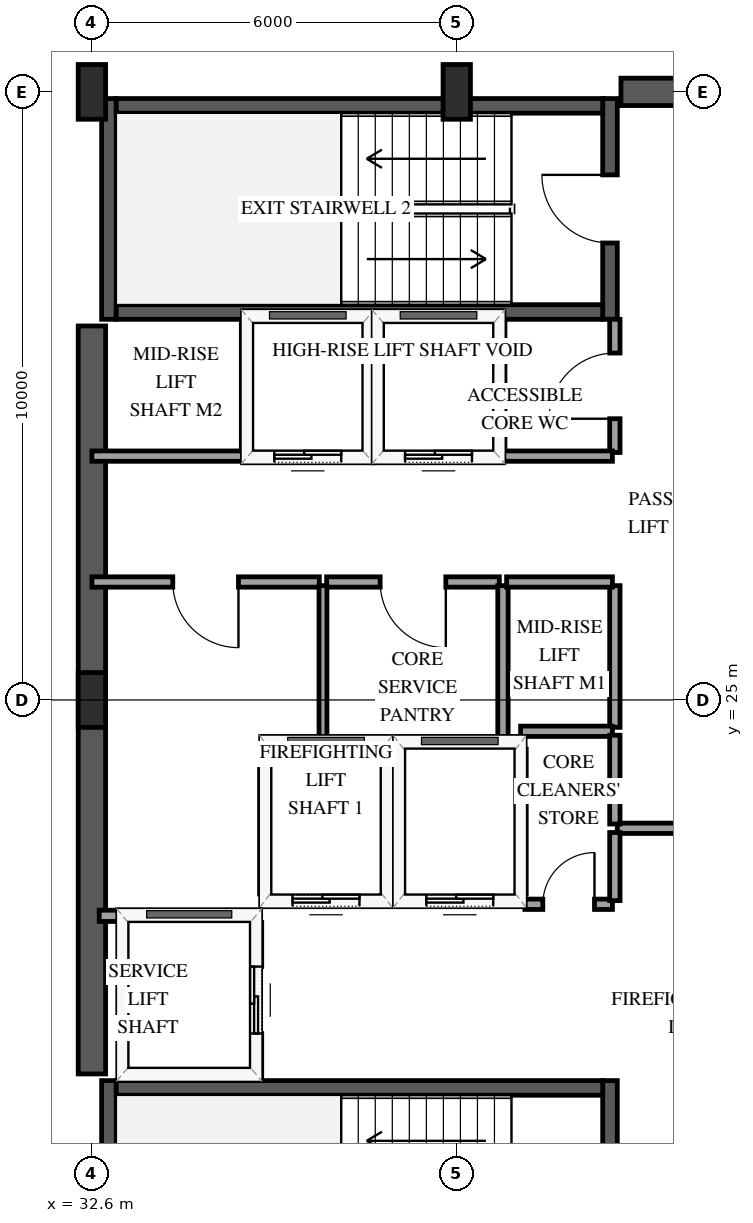
"""IFC4 building model, lengths in metres.
Left out: names, types, materials, properties, quantities, classifications, styles, units other than length and angle.
Written with IfcOpenShell. Run it as: python <this file> out.ifc"""

import sys

from ifc_helpers import new_model, si_unit, direction, frame, frame_2d, origin, origin_2d, place, context, subcontext, project, spatial, rectangle, extrude, element, fill, save


model = new_model("IFC4")
c1 = context("Model", 3, precision=1e-05, world=origin(), true_north=direction((0.0, 1.0)))
c2 = subcontext(c1, "Body", "Model", "MODEL_VIEW")
j1 = project(units=[si_unit("LENGTHUNIT", "METRE"), si_unit("PLANEANGLEUNIT", "RADIAN")], contexts=[c1])
p1 = place(None, origin())
s1 = spatial("IfcSite", under=j1, at=p1, CompositionType="ELEMENT")
p2 = place(p1, origin())
s2 = spatial("IfcBuilding", under=s1, at=p2, CompositionType="ELEMENT")
p3 = place(p2, frame((0.0, 0.0, 242.5)))
s3 = spatial("IfcBuildingStorey", under=s2, at=p3, CompositionType="ELEMENT", Elevation=242.5)
p4 = place(p3, frame((32.88, 15.11, 0.0), z_axis=(0.0, 0.0, 1.0), x_axis=(0.0, 1.0, 0.0)))
e1 = element("IfcWall", 1, at=p4, inside=s3, PredefinedType="SHEAR", context=c2, shape_type="SweptSolid", body=[
    extrude(rectangle(XDim=3.63, YDim=0.24, at=frame_2d((1.815, 0.0))), origin(), (0.0, 0.0, 1.0), 3.75),
])
p5 = place(p3, frame((41.12, 15.11, 0.0), z_axis=(0.0, 0.0, 1.0), x_axis=(0.0, 1.0, 0.0)))
e2 = element("IfcWall", 2, at=p5, inside=s3, PredefinedType="SHEAR", context=c2, shape_type="SweptSolid", body=[
    extrude(rectangle(XDim=3.63, YDim=0.24, at=frame_2d((1.815, 0.0))), origin(), (0.0, 0.0, 1.0), 3.75),
])
p6 = place(p5, frame((1.255, 0.0, 0.0)))
e3 = element("IfcOpeningElement", 3, at=p6, cuts=e2, PredefinedType="OPENING", context=c2, shape_type="SweptSolid", body=[
    extrude(rectangle(XDim=1.12, YDim=2.15, at=frame_2d((0.56, 1.075))), frame((0.0, 0.13, 0.0), z_axis=(0.0, -1.0, 0.0), x_axis=(1.0, 0.0, 0.0)), (0.0, 0.0, 1.0), 0.26),
])
p7 = place(p3, frame((33.0, 18.62, 0.0), z_axis=(0.0, 0.0, 1.0), x_axis=(1.0, 0.0, 0.0)))
e4 = element("IfcWall", 4, at=p7, inside=s3, PredefinedType="SHEAR", context=c2, shape_type="SweptSolid", body=[
    extrude(rectangle(XDim=8.0, YDim=0.24, at=frame_2d((4.0, 0.0))), origin(), (0.0, 0.0, 1.0), 3.75),
])
p8 = place(p3, frame((32.88, 31.26, 0.0), z_axis=(0.0, 0.0, 1.0), x_axis=(0.0, 1.0, 0.0)))
e5 = element("IfcWall", 5, at=p8, inside=s3, PredefinedType="SHEAR", context=c2, shape_type="SweptSolid", body=[
    extrude(rectangle(XDim=3.63, YDim=0.24, at=frame_2d((1.815, 0.0))), origin(), (0.0, 0.0, 1.0), 3.75),
])
p9 = place(p3, frame((41.12, 31.26, 0.0), z_axis=(0.0, 0.0, 1.0), x_axis=(0.0, 1.0, 0.0)))
e6 = element("IfcWall", 6, at=p9, inside=s3, PredefinedType="SHEAR", context=c2, shape_type="SweptSolid", body=[
    extrude(rectangle(XDim=3.63, YDim=0.24, at=frame_2d((1.815, 0.0))), origin(), (0.0, 0.0, 1.0), 3.75),
])
p10 = place(p9, frame((1.255, 0.0, 0.0)))
e7 = element("IfcOpeningElement", 7, at=p10, cuts=e6, PredefinedType="OPENING", context=c2, shape_type="SweptSolid", body=[
    extrude(rectangle(XDim=1.12, YDim=2.15, at=frame_2d((0.56, 1.075))), frame((0.0, 0.13, 0.0), z_axis=(0.0, -1.0, 0.0), x_axis=(1.0, 0.0, 0.0)), (0.0, 0.0, 1.0), 0.26),
])
for number, where, z_axis, x_axis in (
    (8, (33.0, 31.38, 0.0), (0.0, 0.0, 1.0), (1.0, 0.0, 0.0)),
    (9, (33.0, 34.77, 0.0), (0.0, 0.0, 1.0), (1.0, 0.0, 0.0)),
):
    element("IfcWall", number, at=place(p3, frame(where, z_axis=z_axis, x_axis=x_axis)), inside=s3, PredefinedType="SHEAR", context=c2, shape_type="SweptSolid", body=[
        extrude(rectangle(XDim=8.0, YDim=0.24, at=frame_2d((4.0, 0.0))), origin(), (0.0, 0.0, 1.0), 3.75),
    ])
p11 = place(p3, frame((32.6, 18.85, 0.0), z_axis=(0.0, 0.0, 1.0), x_axis=(0.0, 1.0, 0.0)))
e10 = element("IfcWall", 10, at=p11, inside=s3, PredefinedType="SHEAR", context=c2, shape_type="SweptSolid", body=[
    extrude(rectangle(XDim=12.3, YDim=0.45, at=frame_2d((6.15, 0.0))), origin(), (0.0, 0.0, 1.0), 3.75),
])
p12 = place(p3, frame((41.3, 35.0, 0.0), z_axis=(0.0, 0.0, 1.0), x_axis=(1.0, 0.0, 0.0)))
e11 = element("IfcWall", 11, at=p12, inside=s3, PredefinedType="SHEAR", context=c2, shape_type="SweptSolid", body=[
    extrude(rectangle(XDim=2.85, YDim=0.45, at=frame_2d((1.425, 0.0))), origin(), (0.0, 0.0, 1.0), 3.75),
])
for number, where, z_axis, x_axis in (
    (12, (32.6, 25.0, -0.3), (0.0, 0.0, 1.0), (1.0, 0.0, 0.0)),
    (13, (32.6, 35.0, -0.3), (0.0, 0.0, 1.0), (1.0, 0.0, 0.0)),
    (14, (38.6, 35.0, -0.3), (0.0, 0.0, 1.0), (1.0, 0.0, 0.0)),
):
    element("IfcColumn", number, at=place(p3, frame(where, z_axis=z_axis, x_axis=x_axis)), inside=s3, PredefinedType="PILASTER", context=c2, shape_type="SweptSolid", body=[
        extrude(rectangle(XDim=0.45, YDim=0.9, at=origin_2d()), origin(), (0.0, 0.0, 1.0), 4.05),
    ])
p13 = place(p3, frame((35.45, 21.7, 0.0), z_axis=(0.0, 0.0, 1.0), x_axis=(1.0, 0.0, 0.0)))
e15 = element("IfcWall", 15, at=p13, inside=s3, PredefinedType="SOLIDWALL", context=c2, shape_type="SweptSolid", body=[
    extrude(rectangle(XDim=2.0, YDim=0.185, at=frame_2d((1.0, 0.0))), origin(), (0.0, 0.0, 1.0), 3.45),
])
p14 = place(p13, frame((0.45, 0.0, 0.0)))
e16 = element("IfcOpeningElement", 16, at=p14, cuts=e15, PredefinedType="OPENING", context=c2, shape_type="SweptSolid", body=[
    extrude(rectangle(XDim=1.1, YDim=2.15, at=frame_2d((0.55, 1.075))), frame((0.0, 0.103, 0.0), z_axis=(0.0, -1.0, 0.0), x_axis=(1.0, 0.0, 0.0)), (0.0, 0.0, 1.0), 0.205),
])
p15 = place(p3, frame((35.45, 24.3, 0.0), z_axis=(0.0, 0.0, 1.0), x_axis=(1.0, 0.0, 0.0)))
e17 = element("IfcWall", 17, at=p15, inside=s3, PredefinedType="SOLIDWALL", context=c2, shape_type="SweptSolid", body=[
    extrude(rectangle(XDim=2.0, YDim=0.185, at=frame_2d((1.0, 0.0))), origin(), (0.0, 0.0, 1.0), 3.45),
])
for number, where, z_axis, x_axis in (
    (18, (35.45, 21.81, 0.0), (0.0, 0.0, 1.0), (0.0, 1.0, 0.0)),
    (19, (37.45, 21.81, 0.0), (0.0, 0.0, 1.0), (0.0, 1.0, 0.0)),
):
    element("IfcWall", number, at=place(p3, frame(where, z_axis=z_axis, x_axis=x_axis)), inside=s3, PredefinedType="SOLIDWALL", context=c2, shape_type="SweptSolid", body=[
        extrude(rectangle(XDim=2.38, YDim=0.185, at=frame_2d((1.19, 0.0))), origin(), (0.0, 0.0, 1.0), 3.45),
    ])
p16 = place(p3, frame((37.65, 21.7, 0.0), z_axis=(0.0, 0.0, 1.0), x_axis=(1.0, 0.0, 0.0)))
e20 = element("IfcWall", 20, at=p16, inside=s3, PredefinedType="SOLIDWALL", context=c2, shape_type="SweptSolid", body=[
    extrude(rectangle(XDim=2.0, YDim=0.185, at=frame_2d((1.0, 0.0))), origin(), (0.0, 0.0, 1.0), 3.45),
])
p17 = place(p16, frame((0.45, 0.0, 0.0)))
e21 = element("IfcOpeningElement", 21, at=p17, cuts=e20, PredefinedType="OPENING", context=c2, shape_type="SweptSolid", body=[
    extrude(rectangle(XDim=1.1, YDim=2.15, at=frame_2d((0.55, 1.075))), frame((0.0, 0.103, 0.0), z_axis=(0.0, -1.0, 0.0), x_axis=(1.0, 0.0, 0.0)), (0.0, 0.0, 1.0), 0.205),
])
p18 = place(p3, frame((37.65, 24.3, 0.0), z_axis=(0.0, 0.0, 1.0), x_axis=(1.0, 0.0, 0.0)))
e22 = element("IfcWall", 22, at=p18, inside=s3, PredefinedType="SOLIDWALL", context=c2, shape_type="SweptSolid", body=[
    extrude(rectangle(XDim=2.0, YDim=0.185, at=frame_2d((1.0, 0.0))), origin(), (0.0, 0.0, 1.0), 3.45),
])
p19 = place(p3, frame((39.65, 21.81, 0.0), z_axis=(0.0, 0.0, 1.0), x_axis=(0.0, 1.0, 0.0)))
e23 = element("IfcWall", 23, at=p19, inside=s3, PredefinedType="SOLIDWALL", context=c2, shape_type="SweptSolid", body=[
    extrude(rectangle(XDim=2.38, YDim=0.185, at=frame_2d((1.19, 0.0))), origin(), (0.0, 0.0, 1.0), 3.45),
])
p20 = place(p3, frame((32.72, 21.45, 0.0), z_axis=(0.0, 0.0, 1.0), x_axis=(1.0, 0.0, 0.0)))
e24 = element("IfcWall", 24, at=p20, inside=s3, PredefinedType="SOLIDWALL", context=c2, shape_type="SweptSolid", body=[
    extrude(rectangle(XDim=2.58, YDim=0.185, at=frame_2d((1.29, 0.0))), origin(), (0.0, 0.0, 1.0), 3.45),
])
p21 = place(p3, frame((35.3, 18.79, 0.0), z_axis=(0.0, 0.0, 1.0), x_axis=(0.0, 1.0, 0.0)))
e25 = element("IfcWall", 25, at=p21, inside=s3, PredefinedType="SOLIDWALL", context=c2, shape_type="SweptSolid", body=[
    extrude(rectangle(XDim=2.55, YDim=0.185, at=frame_2d((1.275, 0.0))), origin(), (0.0, 0.0, 1.0), 3.45),
])
p22 = place(p21, frame((0.725, 0.0, 0.0)))
e26 = element("IfcOpeningElement", 26, at=p22, cuts=e25, PredefinedType="OPENING", context=c2, shape_type="SweptSolid", body=[
    extrude(rectangle(XDim=1.1, YDim=2.15, at=frame_2d((0.55, 1.075))), frame((0.0, 0.103, 0.0), z_axis=(0.0, -1.0, 0.0), x_axis=(1.0, 0.0, 0.0)), (0.0, 0.0, 1.0), 0.205),
])
p23 = place(p3, frame((35.15, 29.0, 0.0), z_axis=(0.0, 0.0, 1.0), x_axis=(1.0, 0.0, 0.0)))
e27 = element("IfcWall", 27, at=p23, inside=s3, PredefinedType="SOLIDWALL", context=c2, shape_type="SweptSolid", body=[
    extrude(rectangle(XDim=2.0, YDim=0.185, at=frame_2d((1.0, 0.0))), origin(), (0.0, 0.0, 1.0), 3.45),
])
p24 = place(p23, frame((0.45, 0.0, 0.0)))
e28 = element("IfcOpeningElement", 28, at=p24, cuts=e27, PredefinedType="OPENING", context=c2, shape_type="SweptSolid", body=[
    extrude(rectangle(XDim=1.1, YDim=2.15, at=frame_2d((0.55, 1.075))), frame((0.0, 0.103, 0.0), z_axis=(0.0, -1.0, 0.0), x_axis=(1.0, 0.0, 0.0)), (0.0, 0.0, 1.0), 0.205),
])
for number, where, z_axis, x_axis in (
    (29, (35.15, 29.11, 0.0), (0.0, 0.0, 1.0), (0.0, 1.0, 0.0)),
    (30, (37.15, 29.11, 0.0), (0.0, 0.0, 1.0), (0.0, 1.0, 0.0)),
):
    element("IfcWall", number, at=place(p3, frame(where, z_axis=z_axis, x_axis=x_axis)), inside=s3, PredefinedType="SOLIDWALL", context=c2, shape_type="SweptSolid", body=[
        extrude(rectangle(XDim=2.1, YDim=0.185, at=frame_2d((1.05, 0.0))), origin(), (0.0, 0.0, 1.0), 3.45),
    ])
p25 = place(p3, frame((37.3, 29.0, 0.0), z_axis=(0.0, 0.0, 1.0), x_axis=(1.0, 0.0, 0.0)))
e31 = element("IfcWall", 31, at=p25, inside=s3, PredefinedType="SOLIDWALL", context=c2, shape_type="SweptSolid", body=[
    extrude(rectangle(XDim=2.0, YDim=0.185, at=frame_2d((1.0, 0.0))), origin(), (0.0, 0.0, 1.0), 3.45),
])
p26 = place(p25, frame((0.45, 0.0, 0.0)))
e32 = element("IfcOpeningElement", 32, at=p26, cuts=e31, PredefinedType="OPENING", context=c2, shape_type="SweptSolid", body=[
    extrude(rectangle(XDim=1.1, YDim=2.15, at=frame_2d((0.55, 1.075))), frame((0.0, 0.103, 0.0), z_axis=(0.0, -1.0, 0.0), x_axis=(1.0, 0.0, 0.0)), (0.0, 0.0, 1.0), 0.205),
])
p27 = place(p3, frame((39.3, 29.11, 0.0), z_axis=(0.0, 0.0, 1.0), x_axis=(0.0, 1.0, 0.0)))
e33 = element("IfcWall", 33, at=p27, inside=s3, PredefinedType="SOLIDWALL", context=c2, shape_type="SweptSolid", body=[
    extrude(rectangle(XDim=2.1, YDim=0.185, at=frame_2d((1.05, 0.0))), origin(), (0.0, 0.0, 1.0), 3.45),
])
p28 = place(p3, frame((36.34, 26.94, 0.0), z_axis=(0.0, 0.0, 1.0), x_axis=(-1.0, 0.0, 0.0)))
e34 = element("IfcWall", 34, at=p28, inside=s3, PredefinedType="PARTITIONING", context=c2, shape_type="SweptSolid", body=[
    extrude(rectangle(XDim=3.74, YDim=0.17, at=frame_2d((1.87, 0.0))), origin(), (0.0, 0.0, 1.0), 3.45),
])
p29 = place(p28, frame((1.33, 0.0, 0.0)))
e35 = element("IfcOpeningElement", 35, at=p29, cuts=e34, PredefinedType="OPENING", context=c2, shape_type="SweptSolid", body=[
    extrude(rectangle(XDim=1.08, YDim=2.15, at=frame_2d((0.54, 1.075))), frame((0.0, 0.095, 0.0), z_axis=(0.0, -1.0, 0.0), x_axis=(1.0, 0.0, 0.0)), (0.0, 0.0, 1.0), 0.19),
])
p30 = place(p3, frame((41.24, 22.89, 0.0), z_axis=(0.0, 0.0, 1.0), x_axis=(1.0, 0.0, 0.0)))
e36 = element("IfcWall", 36, at=p30, inside=s3, PredefinedType="PARTITIONING", context=c2, shape_type="SweptSolid", body=[
    extrude(rectangle(XDim=3.32, YDim=0.17, at=frame_2d((1.66, 0.0))), origin(), (0.0, 0.0, 1.0), 3.45),
])
p31 = place(p30, frame((1.12, 0.0, 0.0)))
e37 = element("IfcOpeningElement", 37, at=p31, cuts=e36, PredefinedType="OPENING", context=c2, shape_type="SweptSolid", body=[
    extrude(rectangle(XDim=1.08, YDim=2.15, at=frame_2d((0.54, 1.075))), frame((0.0, 0.095, 0.0), z_axis=(0.0, -1.0, 0.0), x_axis=(1.0, 0.0, 0.0)), (0.0, 0.0, 1.0), 0.19),
])
p32 = place(p3, frame((39.3, 26.94, 0.0), z_axis=(0.0, 0.0, 1.0), x_axis=(-1.0, 0.0, 0.0)))
e38 = element("IfcWall", 38, at=p32, inside=s3, PredefinedType="PARTITIONING", context=c2, shape_type="SweptSolid", body=[
    extrude(rectangle(XDim=2.84, YDim=0.17, at=frame_2d((1.42, 0.0))), origin(), (0.0, 0.0, 1.0), 3.45),
])
p33 = place(p32, frame((0.88, 0.0, 0.0)))
e39 = element("IfcOpeningElement", 39, at=p33, cuts=e38, PredefinedType="OPENING", context=c2, shape_type="SweptSolid", body=[
    extrude(rectangle(XDim=1.08, YDim=2.15, at=frame_2d((0.54, 1.075))), frame((0.0, 0.095, 0.0), z_axis=(0.0, -1.0, 0.0), x_axis=(1.0, 0.0, 0.0)), (0.0, 0.0, 1.0), 0.19),
])
p34 = place(p3, frame((36.4, 26.88, 0.0), z_axis=(0.0, 0.0, 1.0), x_axis=(0.0, -1.0, 0.0)))
e40 = element("IfcWall", 40, at=p34, inside=s3, PredefinedType="PARTITIONING", context=c2, shape_type="SweptSolid", body=[
    extrude(rectangle(XDim=2.58, YDim=0.13, at=frame_2d((1.29, 0.0))), origin(), (0.0, 0.0, 1.0), 3.45),
])
p35 = place(p3, frame((39.36, 24.3, 0.0), z_axis=(0.0, 0.0, 1.0), x_axis=(0.0, 1.0, 0.0)))
e41 = element("IfcWall", 41, at=p35, inside=s3, PredefinedType="PARTITIONING", context=c2, shape_type="SweptSolid", body=[
    extrude(rectangle(XDim=2.58, YDim=0.17, at=frame_2d((1.29, 0.0))), origin(), (0.0, 0.0, 1.0), 3.45),
])
p36 = place(p3, frame((32.6, 29.01, 0.0), z_axis=(0.0, 0.0, 1.0), x_axis=(1.0, 0.0, 0.0)))
e42 = element("IfcWall", 42, at=p36, inside=s3, PredefinedType="PARTITIONING", context=c2, shape_type="SweptSolid", body=[
    extrude(rectangle(XDim=2.55, YDim=0.17, at=frame_2d((1.275, 0.0))), origin(), (0.0, 0.0, 1.0), 3.45),
])
p37 = place(p3, frame((41.2, 24.55, 0.0), z_axis=(0.0, 0.0, 1.0), x_axis=(0.0, 1.0, 0.0)))
e43 = element("IfcWall", 43, at=p37, inside=s3, PredefinedType="PARTITIONING", context=c2, shape_type="SweptSolid", body=[
    extrude(rectangle(XDim=2.33, YDim=0.17, at=frame_2d((1.165, 0.0))), origin(), (0.0, 0.0, 1.0), 3.45),
])
p38 = place(p3, frame((41.2, 29.07, 0.0), z_axis=(0.0, 0.0, 1.0), x_axis=(0.0, 1.0, 0.0)))
e44 = element("IfcWall", 44, at=p38, inside=s3, PredefinedType="PARTITIONING", context=c2, shape_type="SweptSolid", body=[
    extrude(rectangle(XDim=2.19, YDim=0.17, at=frame_2d((1.095, 0.0))), origin(), (0.0, 0.0, 1.0), 3.45),
])
p39 = place(p38, frame((0.555, 0.0, 0.0)))
e45 = element("IfcOpeningElement", 45, at=p39, cuts=e44, PredefinedType="OPENING", context=c2, shape_type="SweptSolid", body=[
    extrude(rectangle(XDim=1.08, YDim=2.15, at=frame_2d((0.54, 1.075))), frame((0.0, 0.095, 0.0), z_axis=(0.0, -1.0, 0.0), x_axis=(1.0, 0.0, 0.0)), (0.0, 0.0, 1.0), 0.19),
])
p40 = place(p3, frame((39.3, 29.01, 0.0), z_axis=(0.0, 0.0, 1.0), x_axis=(1.0, 0.0, 0.0)))
e46 = element("IfcWall", 46, at=p40, inside=s3, PredefinedType="PARTITIONING", context=c2, shape_type="SweptSolid", body=[
    extrude(rectangle(XDim=1.86, YDim=0.17, at=frame_2d((0.93, 0.0))), origin(), (0.0, 0.0, 1.0), 3.45),
])
p41 = place(p3, frame((41.16, 26.94, 0.0), z_axis=(0.0, 0.0, 1.0), x_axis=(-1.0, 0.0, 0.0)))
e47 = element("IfcWall", 47, at=p41, inside=s3, PredefinedType="PARTITIONING", context=c2, shape_type="SweptSolid", body=[
    extrude(rectangle(XDim=1.74, YDim=0.17, at=frame_2d((0.87, 0.0))), origin(), (0.0, 0.0, 1.0), 3.45),
])
p42 = place(p3, frame((39.65, 24.485, 0.0), z_axis=(0.0, 0.0, 1.0), x_axis=(1.0, 0.0, 0.0)))
e48 = element("IfcWall", 48, at=p42, inside=s3, PredefinedType="PARTITIONING", context=c2, shape_type="SweptSolid", body=[
    extrude(rectangle(XDim=1.51, YDim=0.17, at=frame_2d((0.755, 0.0))), origin(), (0.0, 0.0, 1.0), 3.45),
])
p43 = place(p3, frame((41.2, 22.96, 0.0), z_axis=(0.0, 0.0, 1.0), x_axis=(0.0, 1.0, 0.0)))
e49 = element("IfcWall", 49, at=p43, inside=s3, PredefinedType="PARTITIONING", context=c2, shape_type="SweptSolid", body=[
    extrude(rectangle(XDim=1.46, YDim=0.17, at=frame_2d((0.73, 0.0))), origin(), (0.0, 0.0, 1.0), 3.45),
])
p44 = place(p3, frame((39.72, 21.64, 0.0), z_axis=(0.0, 0.0, 1.0), x_axis=(1.0, 0.0, 0.0)))
e50 = element("IfcWall", 50, at=p44, inside=s3, PredefinedType="PARTITIONING", context=c2, shape_type="SweptSolid", body=[
    extrude(rectangle(XDim=1.44, YDim=0.17, at=frame_2d((0.72, 0.0))), origin(), (0.0, 0.0, 1.0), 3.45),
])
p45 = place(p44, frame((0.295, 0.0, 0.0)))
e51 = element("IfcOpeningElement", 51, at=p45, cuts=e50, PredefinedType="OPENING", context=c2, shape_type="SweptSolid", body=[
    extrude(rectangle(XDim=0.85, YDim=2.1, at=frame_2d((0.425, 1.05))), frame((0.0, 0.095, 0.0), z_axis=(0.0, -1.0, 0.0), x_axis=(1.0, 0.0, 0.0)), (0.0, 0.0, 1.0), 0.19),
])
p46 = place(p3, frame((41.2, 21.7, 0.0), z_axis=(0.0, 0.0, 1.0), x_axis=(0.0, 1.0, 0.0)))
e52 = element("IfcWall", 52, at=p46, inside=s3, PredefinedType="PARTITIONING", context=c2, shape_type="SweptSolid", body=[
    extrude(rectangle(XDim=1.12, YDim=0.17, at=frame_2d((0.56, 0.0))), origin(), (0.0, 0.0, 1.0), 3.45),
])
p47 = place(p14, origin())
e53 = element("IfcDoor", 53, at=p47, inside=s3, OperationType="SLIDING_TO_LEFT", PredefinedType="DOOR", context=c2, shape_type="SweptSolid", body=[
    extrude(rectangle(XDim=1.1, YDim=2.15, at=frame_2d((0.55, 1.075))), frame((0.0, 0.025, 0.0), z_axis=(0.0, -1.0, 0.0), x_axis=(1.0, 0.0, 0.0)), (0.0, 0.0, 1.0), 0.05),
])
fill(e16, e53)
p48 = place(p17, origin())
e54 = element("IfcDoor", 54, at=p48, inside=s3, OperationType="SLIDING_TO_LEFT", PredefinedType="DOOR", context=c2, shape_type="SweptSolid", body=[
    extrude(rectangle(XDim=1.1, YDim=2.15, at=frame_2d((0.55, 1.075))), frame((0.0, 0.025, 0.0), z_axis=(0.0, -1.0, 0.0), x_axis=(1.0, 0.0, 0.0)), (0.0, 0.0, 1.0), 0.05),
])
fill(e21, e54)
p49 = place(p22, origin())
e55 = element("IfcDoor", 55, at=p49, inside=s3, OperationType="SLIDING_TO_LEFT", PredefinedType="DOOR", context=c2, shape_type="SweptSolid", body=[
    extrude(rectangle(XDim=1.1, YDim=2.15, at=frame_2d((0.55, 1.075))), frame((0.0, 0.025, 0.0), z_axis=(0.0, -1.0, 0.0), x_axis=(1.0, 0.0, 0.0)), (0.0, 0.0, 1.0), 0.05),
])
fill(e26, e55)
p50 = place(p24, origin())
e56 = element("IfcDoor", 56, at=p50, inside=s3, OperationType="SLIDING_TO_LEFT", PredefinedType="DOOR", context=c2, shape_type="SweptSolid", body=[
    extrude(rectangle(XDim=1.1, YDim=2.15, at=frame_2d((0.55, 1.075))), frame((0.0, 0.025, 0.0), z_axis=(0.0, -1.0, 0.0), x_axis=(1.0, 0.0, 0.0)), (0.0, 0.0, 1.0), 0.05),
])
fill(e28, e56)
p51 = place(p26, origin())
e57 = element("IfcDoor", 57, at=p51, inside=s3, OperationType="SLIDING_TO_LEFT", PredefinedType="DOOR", context=c2, shape_type="SweptSolid", body=[
    extrude(rectangle(XDim=1.1, YDim=2.15, at=frame_2d((0.55, 1.075))), frame((0.0, 0.025, 0.0), z_axis=(0.0, -1.0, 0.0), x_axis=(1.0, 0.0, 0.0)), (0.0, 0.0, 1.0), 0.05),
])
fill(e32, e57)
p52 = place(p10, origin())
e58 = element("IfcDoor", 58, at=p52, inside=s3, OperationType="SINGLE_SWING_RIGHT", PredefinedType="DOOR", context=c2, shape_type="SweptSolid", body=[
    extrude(rectangle(XDim=1.12, YDim=2.15, at=frame_2d((0.56, 1.075))), frame((0.0, 0.025, 0.0), z_axis=(0.0, -1.0, 0.0), x_axis=(1.0, 0.0, 0.0)), (0.0, 0.0, 1.0), 0.05),
])
fill(e7, e58)
p53 = place(p29, origin())
e59 = element("IfcDoor", 59, at=p53, inside=s3, OperationType="SINGLE_SWING_LEFT", PredefinedType="DOOR", context=c2, shape_type="SweptSolid", body=[
    extrude(rectangle(XDim=1.08, YDim=2.15, at=frame_2d((0.54, 1.075))), frame((0.0, 0.025, 0.0), z_axis=(0.0, -1.0, 0.0), x_axis=(1.0, 0.0, 0.0)), (0.0, 0.0, 1.0), 0.05),
])
fill(e35, e59)
p54 = place(p33, origin())
e60 = element("IfcDoor", 60, at=p54, inside=s3, OperationType="SINGLE_SWING_LEFT", PredefinedType="DOOR", context=c2, shape_type="SweptSolid", body=[
    extrude(rectangle(XDim=1.08, YDim=2.15, at=frame_2d((0.54, 1.075))), frame((0.0, 0.025, 0.0), z_axis=(0.0, -1.0, 0.0), x_axis=(1.0, 0.0, 0.0)), (0.0, 0.0, 1.0), 0.05),
])
fill(e39, e60)
p55 = place(p39, origin())
e61 = element("IfcDoor", 61, at=p55, inside=s3, OperationType="SINGLE_SWING_LEFT", PredefinedType="DOOR", context=c2, shape_type="SweptSolid", body=[
    extrude(rectangle(XDim=1.08, YDim=2.15, at=frame_2d((0.54, 1.075))), frame((0.0, 0.025, 0.0), z_axis=(0.0, -1.0, 0.0), x_axis=(1.0, 0.0, 0.0)), (0.0, 0.0, 1.0), 0.05),
])
fill(e45, e61)
p56 = place(p45, origin())
e62 = element("IfcDoor", 62, at=p56, inside=s3, OperationType="SINGLE_SWING_RIGHT", PredefinedType="DOOR", context=c2, shape_type="SweptSolid", body=[
    extrude(rectangle(XDim=0.85, YDim=2.1, at=frame_2d((0.425, 1.05))), frame((0.0, 0.025, 0.0), z_axis=(0.0, -1.0, 0.0), x_axis=(1.0, 0.0, 0.0)), (0.0, 0.0, 1.0), 0.05),
])
fill(e51, e62)
save(model, sys.argv[1])
